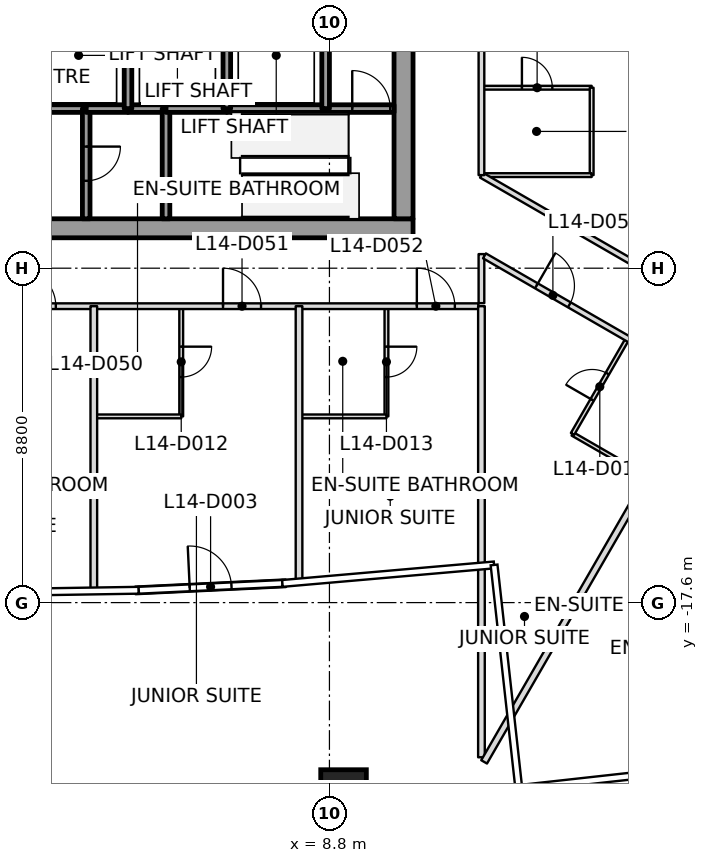
"""IFC4 building model, lengths in metres.
Left out: names, types, materials, properties, quantities, classifications, styles, units other than length and angle.
Written with IfcOpenShell. Run it as: python <this file> out.ifc"""

import sys

from ifc_helpers import new_model, si_unit, direction, frame, frame_2d, origin, origin_2d, place, context, subcontext, project, spatial, rectangle, extrude, clip, halfspace, element, fill, save


model = new_model("IFC4")
c1 = context("Model", 3, precision=1e-05, world=origin(), true_north=direction((0.0, 1.0)))
c2 = subcontext(c1, "Body", "Model", "MODEL_VIEW")
j1 = project(units=[si_unit("LENGTHUNIT", "METRE"), si_unit("PLANEANGLEUNIT", "RADIAN")], contexts=[c1])
p1 = place(None, origin())
s1 = spatial("IfcSite", under=j1, at=p1, CompositionType="ELEMENT")
p2 = place(p1, origin())
s2 = spatial("IfcBuilding", under=s1, at=p2, CompositionType="ELEMENT")
p3 = place(p2, frame((0.0, 0.0, 73.9)))
s3 = spatial("IfcBuildingStorey", under=s2, at=p3, CompositionType="ELEMENT", Elevation=73.9)
p4 = place(p3, frame((9.171, -22.598, 0.0), z_axis=(-0.009587956878, 0.096273594403, 0.99530872904), x_axis=(0.997257375326, 0.073971051832, 0.002451703273)))
e1 = element("IfcColumn", 1, at=p4, inside=s3, PredefinedType="COLUMN", context=c2, shape_type="SweptSolid", body=[
    clip(clip(extrude(rectangle(XDim=1.2, YDim=1.2, at=origin_2d()), origin(), (0.0, 0.0, 1.0), 3.718), halfspace(frame((0.0, 0.0, 0.018)), True)), halfspace(frame((0.0, 0.0, 3.699)), False)),
])
p5 = place(p3, frame((-11.0, -7.75, 0.0), z_axis=(0.0, 0.0, 1.0), x_axis=(1.0, 0.0, 0.0)))
e2 = element("IfcWall", 2, at=p5, inside=s3, PredefinedType="SHEAR", context=c2, shape_type="SweptSolid", body=[
    extrude(rectangle(XDim=22.0, YDim=0.5, at=frame_2d((11.0, 0.0))), origin(), (0.0, 0.0, 1.0), 3.7),
])
p6 = place(p5, frame((10.45, 0.0, 0.0)))
e3 = element("IfcOpeningElement", 3, at=p6, cuts=e2, PredefinedType="OPENING", context=c2, shape_type="SweptSolid", body=[
    extrude(rectangle(XDim=1.1, YDim=2.1, at=frame_2d((0.55, 1.05))), frame((0.0, 0.25, 0.0), z_axis=(0.0, -1.0, 0.0), x_axis=(1.0, 0.0, 0.0)), (0.0, 0.0, 1.0), 0.5),
])
p7 = place(p3, frame((10.75, -7.5, 0.0), z_axis=(0.0, 0.0, 1.0), x_axis=(0.0, 1.0, 0.0)))
e4 = element("IfcWall", 4, at=p7, inside=s3, PredefinedType="SHEAR", context=c2, shape_type="SweptSolid", body=[
    extrude(rectangle(XDim=15.0, YDim=0.5, at=frame_2d((7.5, 0.0))), origin(), (0.0, 0.0, 1.0), 3.7),
])
p8 = place(p7, frame((6.6, 0.0, 0.0)))
e5 = element("IfcOpeningElement", 5, at=p8, cuts=e4, PredefinedType="OPENING", context=c2, shape_type="SweptSolid", body=[
    extrude(rectangle(XDim=1.8, YDim=2.1, at=frame_2d((0.9, 1.05))), frame((0.0, 0.25, 0.0), z_axis=(0.0, -1.0, 0.0), x_axis=(1.0, 0.0, 0.0)), (0.0, 0.0, 1.0), 0.5),
])
p9 = place(p3, frame((3.693, -17.279, 0.0), z_axis=(0.0, 0.0, 1.0), x_axis=(0.998868834381, 0.047550517367, 0.0)))
e6 = element("IfcWall", 6, at=p9, inside=s3, PredefinedType="SOLIDWALL", context=c2, shape_type="SweptSolid", body=[
    extrude(rectangle(XDim=3.964, YDim=0.2, at=frame_2d((1.982, 0.0))), origin(), (0.0, 0.0, 1.0), 2.947),
])
p10 = place(p9, frame((1.432, 0.0, 0.0)))
e7 = element("IfcOpeningElement", 7, at=p10, cuts=e6, PredefinedType="OPENING", context=c2, shape_type="SweptSolid", body=[
    extrude(rectangle(XDim=1.1, YDim=2.1, at=frame_2d((0.55, 1.05))), frame((0.0, 0.1, 0.0), z_axis=(0.0, -1.0, 0.0), x_axis=(1.0, 0.0, 0.0)), (0.0, 0.0, 1.0), 0.2),
])
p11 = place(p3, frame((0.9, -4.6, 0.0), z_axis=(0.0, 0.0, 1.0), x_axis=(1.0, 0.0, 0.0)))
e8 = element("IfcWall", 8, at=p11, inside=s3, PredefinedType="SOLIDWALL", context=c2, shape_type="SweptSolid", body=[
    extrude(rectangle(XDim=1.5, YDim=0.2, at=frame_2d((0.75, 0.0))), origin(), (0.0, 0.0, 1.0), 3.55),
])
p12 = place(p3, frame((2.4, -4.6, 0.0), z_axis=(0.0, 0.0, 1.0), x_axis=(0.0, -1.0, 0.0)))
e9 = element("IfcWall", 9, at=p12, inside=s3, PredefinedType="SOLIDWALL", context=c2, shape_type="SweptSolid", body=[
    extrude(rectangle(XDim=2.9, YDim=0.2, at=frame_2d((1.45, 0.0))), origin(), (0.0, 0.0, 1.0), 3.55),
])
p13 = place(p12, frame((1.0, 0.0, 0.0)))
e10 = element("IfcOpeningElement", 10, at=p13, cuts=e9, PredefinedType="OPENING", context=c2, shape_type="SweptSolid", body=[
    extrude(rectangle(XDim=0.9, YDim=2.1, at=frame_2d((0.45, 1.05))), frame((0.0, 0.1, 0.0), z_axis=(0.0, -1.0, 0.0), x_axis=(1.0, 0.0, 0.0)), (0.0, 0.0, 1.0), 0.2),
])
p14 = place(p3, frame((3.5, -4.6, 0.0), z_axis=(0.0, 0.0, 1.0), x_axis=(-1.0, 0.0, 0.0)))
e11 = element("IfcWall", 11, at=p14, inside=s3, PredefinedType="SOLIDWALL", context=c2, shape_type="SweptSolid", body=[
    extrude(rectangle(XDim=1.1, YDim=0.2, at=frame_2d((0.55, 0.0))), origin(), (0.0, 0.0, 1.0), 3.55),
])
p15 = place(p3, frame((4.5, -4.6, 0.0), z_axis=(0.0, 0.0, 1.0), x_axis=(-1.0, 0.0, 0.0)))
e12 = element("IfcWall", 12, at=p15, inside=s3, PredefinedType="SOLIDWALL", context=c2, shape_type="SweptSolid", body=[
    extrude(rectangle(XDim=1.0, YDim=0.2, at=frame_2d((0.5, 0.0))), origin(), (0.0, 0.0, 1.0), 3.55),
])
p16 = place(p3, frame((3.5, -4.6, 0.0), z_axis=(0.0, 0.0, 1.0), x_axis=(0.0, 1.0, 0.0)))
e13 = element("IfcWall", 13, at=p16, inside=s3, PredefinedType="SOLIDWALL", context=c2, shape_type="SweptSolid", body=[
    extrude(rectangle(XDim=2.8, YDim=0.2, at=frame_2d((1.4, 0.0))), origin(), (0.0, 0.0, 1.0), 3.55),
])
p17 = place(p3, frame((4.5, -7.5, 0.0), z_axis=(0.0, 0.0, 1.0), x_axis=(0.0, 1.0, 0.0)))
e14 = element("IfcWall", 14, at=p17, inside=s3, PredefinedType="SOLIDWALL", context=c2, shape_type="SweptSolid", body=[
    extrude(rectangle(XDim=2.9, YDim=0.2, at=frame_2d((1.45, 0.0))), origin(), (0.0, 0.0, 1.0), 3.55),
])
p18 = place(p3, frame((4.5, -4.6, 0.0), z_axis=(0.0, 0.0, 1.0), x_axis=(1.0, 0.0, 0.0)))
e15 = element("IfcWall", 15, at=p18, inside=s3, PredefinedType="SOLIDWALL", context=c2, shape_type="SweptSolid", body=[
    extrude(rectangle(XDim=1.6, YDim=0.2, at=frame_2d((0.8, 0.0))), origin(), (0.0, 0.0, 1.0), 3.55),
])
p19 = place(p3, frame((6.1, -4.6, 0.0), z_axis=(0.0, 0.0, 1.0), x_axis=(1.0, 0.0, 0.0)))
e16 = element("IfcWall", 16, at=p19, inside=s3, PredefinedType="SOLIDWALL", context=c2, shape_type="SweptSolid", body=[
    extrude(rectangle(XDim=2.6, YDim=0.2, at=frame_2d((1.3, 0.0))), origin(), (0.0, 0.0, 1.0), 3.55),
])
p20 = place(p3, frame((6.1, -4.6, 0.0), z_axis=(0.0, 0.0, 1.0), x_axis=(0.0, 1.0, 0.0)))
e17 = element("IfcWall", 17, at=p20, inside=s3, PredefinedType="SOLIDWALL", context=c2, shape_type="SweptSolid", body=[
    extrude(rectangle(XDim=2.8, YDim=0.2, at=frame_2d((1.4, 0.0))), origin(), (0.0, 0.0, 1.0), 3.55),
])
p21 = place(p3, frame((8.7, -4.6, 0.0), z_axis=(0.0, 0.0, 1.0), x_axis=(1.0, 0.0, 0.0)))
e18 = element("IfcWall", 18, at=p21, inside=s3, PredefinedType="SOLIDWALL", context=c2, shape_type="SweptSolid", body=[
    extrude(rectangle(XDim=1.8, YDim=0.2, at=frame_2d((0.9, 0.0))), origin(), (0.0, 0.0, 1.0), 3.55),
])
p22 = place(p21, frame((0.7, 0.0, 0.0)))
e19 = element("IfcOpeningElement", 19, at=p22, cuts=e18, PredefinedType="OPENING", context=c2, shape_type="SweptSolid", body=[
    extrude(rectangle(XDim=1.0, YDim=2.1, at=frame_2d((0.5, 1.05))), frame((0.0, 0.1, 0.0), z_axis=(0.0, -1.0, 0.0), x_axis=(1.0, 0.0, 0.0)), (0.0, 0.0, 1.0), 0.2),
])
p23 = place(p3, frame((8.7, -1.8, 0.0), z_axis=(0.0, 0.0, 1.0), x_axis=(0.0, -1.0, 0.0)))
e20 = element("IfcWall", 20, at=p23, inside=s3, PredefinedType="SOLIDWALL", context=c2, shape_type="SweptSolid", body=[
    extrude(rectangle(XDim=2.8, YDim=0.2, at=frame_2d((1.4, 0.0))), origin(), (0.0, 0.0, 1.0), 3.55),
])
p24 = place(p3, frame((2.6, -9.8, 0.0), z_axis=(0.0, 0.0, 1.0), x_axis=(0.0, -1.0, 0.0)))
e21 = element("IfcWall", 21, at=p24, inside=s3, PredefinedType="PARTITIONING", context=c2, shape_type="SweptSolid", body=[
    extrude(rectangle(XDim=7.503, YDim=0.175, at=frame_2d((3.751, 0.0))), origin(), (0.0, 0.0, 1.0), 3.15),
])
p25 = place(p3, frame((8.0, -9.8, 0.0), z_axis=(0.0, 0.0, 1.0), x_axis=(0.0, -1.0, 0.0)))
e22 = element("IfcWall", 22, at=p25, inside=s3, PredefinedType="PARTITIONING", context=c2, shape_type="SweptSolid", body=[
    extrude(rectangle(XDim=7.264, YDim=0.175, at=frame_2d((3.632, 0.0))), origin(), (0.0, 0.0, 1.0), 3.15),
])
p26 = place(p3, frame((12.8, -9.8, 0.0), z_axis=(0.0, 0.0, 1.0), x_axis=(0.0, -1.0, 0.0)))
e23 = element("IfcWall", 23, at=p26, inside=s3, PredefinedType="PARTITIONING", context=c2, shape_type="SweptSolid", body=[
    extrude(rectangle(XDim=11.87, YDim=0.175, at=frame_2d((5.935, 0.0))), origin(), (0.0, 0.0, 1.0), 3.15),
])
p27 = place(p3, frame((18.638, -11.8, 0.0), z_axis=(0.0, 0.0, 1.0), x_axis=(-0.499983180204, -0.866035114481, 0.0)))
e24 = element("IfcWall", 24, at=p27, inside=s3, PredefinedType="PARTITIONING", context=c2, shape_type="SweptSolid", body=[
    extrude(rectangle(XDim=11.537, YDim=0.175, at=frame_2d((5.769, 0.0))), origin(), (0.0, 0.0, 1.0), 2.797),
])
p28 = place(p3, frame((-12.72, -9.8, 0.0), z_axis=(0.0, 0.0, 1.0), x_axis=(1.0, 0.0, 0.0)))
e25 = element("IfcWall", 25, at=p28, inside=s3, PredefinedType="PARTITIONING", context=c2, shape_type="SweptSolid", body=[
    extrude(rectangle(XDim=25.44, YDim=0.15, at=frame_2d((12.72, 0.0))), origin(), (0.0, 0.0, 1.0), 2.947),
])
p29 = place(p28, frame((3.22, 0.0, 0.0)))
e26 = element("IfcOpeningElement", 26, at=p29, cuts=e25, PredefinedType="OPENING", context=c2, shape_type="SweptSolid", body=[
    extrude(rectangle(XDim=1.0, YDim=2.1, at=frame_2d((0.5, 1.05))), frame((0.0, 0.075, 0.0), z_axis=(0.0, -1.0, 0.0), x_axis=(1.0, 0.0, 0.0)), (0.0, 0.0, 1.0), 0.15),
])
p30 = place(p28, frame((8.22, 0.0, 0.0)))
e27 = element("IfcOpeningElement", 27, at=p30, cuts=e25, PredefinedType="OPENING", context=c2, shape_type="SweptSolid", body=[
    extrude(rectangle(XDim=1.0, YDim=2.1, at=frame_2d((0.5, 1.05))), frame((0.0, 0.075, 0.0), z_axis=(0.0, -1.0, 0.0), x_axis=(1.0, 0.0, 0.0)), (0.0, 0.0, 1.0), 0.15),
])
p31 = place(p28, frame((13.32, 0.0, 0.0)))
e28 = element("IfcOpeningElement", 28, at=p31, cuts=e25, PredefinedType="OPENING", context=c2, shape_type="SweptSolid", body=[
    extrude(rectangle(XDim=1.0, YDim=2.1, at=frame_2d((0.5, 1.05))), frame((0.0, 0.075, 0.0), z_axis=(0.0, -1.0, 0.0), x_axis=(1.0, 0.0, 0.0)), (0.0, 0.0, 1.0), 0.15),
])
p32 = place(p28, frame((18.72, 0.0, 0.0)))
e29 = element("IfcOpeningElement", 29, at=p32, cuts=e25, PredefinedType="OPENING", context=c2, shape_type="SweptSolid", body=[
    extrude(rectangle(XDim=1.0, YDim=2.1, at=frame_2d((0.5, 1.05))), frame((0.0, 0.075, 0.0), z_axis=(0.0, -1.0, 0.0), x_axis=(1.0, 0.0, 0.0)), (0.0, 0.0, 1.0), 0.15),
])
p33 = place(p28, frame((23.82, 0.0, 0.0)))
e30 = element("IfcOpeningElement", 30, at=p33, cuts=e25, PredefinedType="OPENING", context=c2, shape_type="SweptSolid", body=[
    extrude(rectangle(XDim=1.0, YDim=2.1, at=frame_2d((0.5, 1.05))), frame((0.0, 0.075, 0.0), z_axis=(0.0, -1.0, 0.0), x_axis=(1.0, 0.0, 0.0)), (0.0, 0.0, 1.0), 0.15),
])
p34 = place(p3, frame((12.8, -9.72, 0.0), z_axis=(0.0, 0.0, 1.0), x_axis=(0.0, 1.0, 0.0)))
e31 = element("IfcWall", 31, at=p34, inside=s3, PredefinedType="PARTITIONING", context=c2, shape_type="SweptSolid", body=[
    extrude(rectangle(XDim=1.291, YDim=0.15, at=frame_2d((0.646, 0.0))), origin(), (0.0, 0.0, 1.0), 2.797),
])
p35 = place(p3, frame((12.879, -8.475, 0.0), z_axis=(0.0, 0.0, 1.0), x_axis=(0.866022251081, -0.500005460603, 0.0)))
e32 = element("IfcWall", 32, at=p35, inside=s3, PredefinedType="PARTITIONING", context=c2, shape_type="SweptSolid", body=[
    extrude(rectangle(XDim=11.45, YDim=0.15, at=frame_2d((5.725, 0.0))), origin(), (0.0, 0.0, 1.0), 2.797),
])
p36 = place(p35, frame((1.579, 0.0, 0.0)))
e33 = element("IfcOpeningElement", 33, at=p36, cuts=e32, PredefinedType="OPENING", context=c2, shape_type="SweptSolid", body=[
    extrude(rectangle(XDim=1.0, YDim=2.1, at=frame_2d((0.5, 1.05))), frame((0.0, 0.075, 0.0), z_axis=(0.0, -1.0, 0.0), x_axis=(1.0, 0.0, 0.0)), (0.0, 0.0, 1.0), 0.15),
])
p37 = place(p35, frame((9.75, 0.0, 0.0)))
e34 = element("IfcOpeningElement", 34, at=p37, cuts=e32, PredefinedType="OPENING", context=c2, shape_type="SweptSolid", body=[
    extrude(rectangle(XDim=1.0, YDim=2.1, at=frame_2d((0.5, 1.05))), frame((0.0, 0.075, 0.0), z_axis=(0.0, -1.0, 0.0), x_axis=(1.0, 0.0, 0.0)), (0.0, 0.0, 1.0), 0.15),
])
p38 = place(p3, frame((23.626, -12.601, 0.0), z_axis=(0.0, 0.0, 1.0), x_axis=(-0.866025575766, 0.499999702119, 0.0)))
e35 = element("IfcWall", 35, at=p38, inside=s3, PredefinedType="PARTITIONING", context=c2, shape_type="SweptSolid", body=[
    extrude(rectangle(XDim=12.501, YDim=0.15, at=frame_2d((6.25, 0.0))), origin(), (0.0, 0.0, 1.0), 2.947),
])
p39 = place(p38, frame((4.51, 0.0, 0.0)))
e36 = element("IfcOpeningElement", 36, at=p39, cuts=e35, PredefinedType="OPENING", context=c2, shape_type="SweptSolid", body=[
    extrude(rectangle(XDim=1.0, YDim=2.1, at=frame_2d((0.5, 1.05))), frame((0.0, 0.075, 0.0), z_axis=(0.0, -1.0, 0.0), x_axis=(1.0, 0.0, 0.0)), (0.0, 0.0, 1.0), 0.15),
])
p40 = place(p3, frame((12.8, -6.351, 0.0), z_axis=(0.0, 0.0, 1.0), x_axis=(0.0, 1.0, 0.0)))
e37 = element("IfcWall", 37, at=p40, inside=s3, PredefinedType="PARTITIONING", context=c2, shape_type="SweptSolid", body=[
    extrude(rectangle(XDim=16.071, YDim=0.15, at=frame_2d((8.035, 0.0))), origin(), (0.0, 0.0, 1.0), 2.947),
])
p41 = place(p40, frame((13.251, 0.0, 0.0)))
e38 = element("IfcOpeningElement", 38, at=p41, cuts=e37, PredefinedType="OPENING", context=c2, shape_type="SweptSolid", body=[
    extrude(rectangle(XDim=1.0, YDim=2.1, at=frame_2d((0.5, 1.05))), frame((0.0, 0.075, 0.0), z_axis=(0.0, -1.0, 0.0), x_axis=(1.0, 0.0, 0.0)), (0.0, 0.0, 1.0), 0.15),
])
p42 = place(p40, frame((6.375, 0.0, 0.0)))
e39 = element("IfcOpeningElement", 39, at=p42, cuts=e37, PredefinedType="OPENING", context=c2, shape_type="SweptSolid", body=[
    extrude(rectangle(XDim=1.0, YDim=2.1, at=frame_2d((0.5, 1.05))), frame((0.0, 0.075, 0.0), z_axis=(0.0, -1.0, 0.0), x_axis=(1.0, 0.0, 0.0)), (0.0, 0.0, 1.0), 0.15),
])
p43 = place(p3, frame((4.9, -9.83, 0.0), z_axis=(0.0, 0.0, 1.0), x_axis=(0.0, -1.0, 0.0)))
e40 = element("IfcWall", 40, at=p43, inside=s3, PredefinedType="PARTITIONING", context=c2, shape_type="SweptSolid", body=[
    extrude(rectangle(XDim=2.87, YDim=0.1, at=frame_2d((1.435, 0.0))), origin(), (0.0, 0.0, 1.0), 2.947),
])
p44 = place(p43, frame((1.035, 0.0, 0.0)))
e41 = element("IfcOpeningElement", 41, at=p44, cuts=e40, PredefinedType="OPENING", context=c2, shape_type="SweptSolid", body=[
    extrude(rectangle(XDim=0.8, YDim=2.1, at=frame_2d((0.4, 1.05))), frame((0.0, 0.05, 0.0), z_axis=(0.0, -1.0, 0.0), x_axis=(1.0, 0.0, 0.0)), (0.0, 0.0, 1.0), 0.1),
])
p45 = place(p3, frame((4.9, -12.7, 0.0), z_axis=(0.0, 0.0, 1.0), x_axis=(-1.0, 0.0, 0.0)))
e42 = element("IfcWall", 42, at=p45, inside=s3, PredefinedType="PARTITIONING", context=c2, shape_type="SweptSolid", body=[
    extrude(rectangle(XDim=2.27, YDim=0.1, at=frame_2d((1.135, 0.0))), origin(), (0.0, 0.0, 1.0), 2.947),
])
p46 = place(p3, frame((10.3, -9.83, 0.0), z_axis=(0.0, 0.0, 1.0), x_axis=(0.0, -1.0, 0.0)))
e43 = element("IfcWall", 43, at=p46, inside=s3, PredefinedType="PARTITIONING", context=c2, shape_type="SweptSolid", body=[
    extrude(rectangle(XDim=2.87, YDim=0.1, at=frame_2d((1.435, 0.0))), origin(), (0.0, 0.0, 1.0), 3.15),
])
p47 = place(p46, frame((1.035, 0.0, 0.0)))
e44 = element("IfcOpeningElement", 44, at=p47, cuts=e43, PredefinedType="OPENING", context=c2, shape_type="SweptSolid", body=[
    extrude(rectangle(XDim=0.8, YDim=2.1, at=frame_2d((0.4, 1.05))), frame((0.0, 0.05, 0.0), z_axis=(0.0, -1.0, 0.0), x_axis=(1.0, 0.0, 0.0)), (0.0, 0.0, 1.0), 0.1),
])
p48 = place(p3, frame((10.3, -12.7, 0.0), z_axis=(0.0, 0.0, 1.0), x_axis=(-1.0, 0.0, 0.0)))
e45 = element("IfcWall", 45, at=p48, inside=s3, PredefinedType="PARTITIONING", context=c2, shape_type="SweptSolid", body=[
    extrude(rectangle(XDim=2.27, YDim=0.1, at=frame_2d((1.135, 0.0))), origin(), (0.0, 0.0, 1.0), 3.15),
])
p49 = place(p3, frame((12.83, -4.051, 0.0), z_axis=(0.0, 0.0, 1.0), x_axis=(1.0, 0.0, 0.0)))
e46 = element("IfcWall", 46, at=p49, inside=s3, PredefinedType="PARTITIONING", context=c2, shape_type="SweptSolid", body=[
    extrude(rectangle(XDim=2.87, YDim=0.1, at=frame_2d((1.435, 0.0))), origin(), (0.0, 0.0, 1.0), 3.15),
])
p50 = place(p49, frame((1.035, 0.0, 0.0)))
e47 = element("IfcOpeningElement", 47, at=p50, cuts=e46, PredefinedType="OPENING", context=c2, shape_type="SweptSolid", body=[
    extrude(rectangle(XDim=0.8, YDim=2.1, at=frame_2d((0.4, 1.05))), frame((0.0, 0.05, 0.0), z_axis=(0.0, -1.0, 0.0), x_axis=(1.0, 0.0, 0.0)), (0.0, 0.0, 1.0), 0.1),
])
p51 = place(p3, frame((15.7, -4.051, 0.0), z_axis=(0.0, 0.0, 1.0), x_axis=(0.0, -1.0, 0.0)))
e48 = element("IfcWall", 48, at=p51, inside=s3, PredefinedType="PARTITIONING", context=c2, shape_type="SweptSolid", body=[
    extrude(rectangle(XDim=2.3, YDim=0.1, at=frame_2d((1.15, 0.0))), origin(), (0.0, 0.0, 1.0), 2.947),
])
p52 = place(p3, frame((15.7, -6.351, 0.0), z_axis=(0.0, 0.0, 1.0), x_axis=(-1.0, 0.0, 0.0)))
e49 = element("IfcWall", 49, at=p52, inside=s3, PredefinedType="PARTITIONING", context=c2, shape_type="SweptSolid", body=[
    extrude(rectangle(XDim=2.84, YDim=0.1, at=frame_2d((1.42, 0.0))), origin(), (0.0, 0.0, 1.0), 3.15),
])
p53 = place(p3, frame((17.163, -14.297, 0.0), z_axis=(0.0, 0.0, 1.0), x_axis=(-0.866044110172, 0.499967598186, 0.0)))
e50 = element("IfcWall", 50, at=p53, inside=s3, PredefinedType="PARTITIONING", context=c2, shape_type="SweptSolid", body=[
    extrude(rectangle(XDim=2.27, YDim=0.1, at=frame_2d((1.135, 0.0))), origin(), (0.0, 0.0, 1.0), 3.15),
])
p54 = place(p3, frame((15.197, -13.162, 0.0), z_axis=(0.0, 0.0, 1.0), x_axis=(0.499999802827, 0.866025517622, 0.0)))
e51 = element("IfcWall", 51, at=p54, inside=s3, PredefinedType="PARTITIONING", context=c2, shape_type="SweptSolid", body=[
    extrude(rectangle(XDim=2.87, YDim=0.1, at=frame_2d((1.435, 0.0))), origin(), (0.0, 0.0, 1.0), 2.797),
])
p55 = place(p54, frame((1.035, 0.0, 0.0)))
e52 = element("IfcOpeningElement", 52, at=p55, cuts=e51, PredefinedType="OPENING", context=c2, shape_type="SweptSolid", body=[
    extrude(rectangle(XDim=0.8, YDim=2.1, at=frame_2d((0.4, 1.05))), frame((0.0, 0.05, 0.0), z_axis=(0.0, -1.0, 0.0), x_axis=(1.0, 0.0, 0.0)), (0.0, 0.0, 1.0), 0.1),
])
p56 = place(p10, origin())
e53 = element("IfcDoor", 53, at=p56, inside=s3, OperationType="SINGLE_SWING_RIGHT", PredefinedType="DOOR", context=c2, shape_type="SweptSolid", body=[
    extrude(rectangle(XDim=1.1, YDim=2.1, at=frame_2d((0.55, 1.05))), frame((0.0, 0.025, 0.0), z_axis=(0.0, -1.0, 0.0), x_axis=(1.0, 0.0, 0.0)), (0.0, 0.0, 1.0), 0.05),
])
fill(e7, e53)
p57 = place(p31, origin())
e54 = element("IfcDoor", 54, at=p57, inside=s3, OperationType="SINGLE_SWING_LEFT", PredefinedType="DOOR", context=c2, shape_type="SweptSolid", body=[
    extrude(rectangle(XDim=1.0, YDim=2.1, at=frame_2d((0.5, 1.05))), frame((0.0, 0.025, 0.0), z_axis=(0.0, -1.0, 0.0), x_axis=(1.0, 0.0, 0.0)), (0.0, 0.0, 1.0), 0.05),
])
fill(e28, e54)
p58 = place(p32, origin())
e55 = element("IfcDoor", 55, at=p58, inside=s3, OperationType="SINGLE_SWING_LEFT", PredefinedType="DOOR", context=c2, shape_type="SweptSolid", body=[
    extrude(rectangle(XDim=1.0, YDim=2.1, at=frame_2d((0.5, 1.05))), frame((0.0, 0.025, 0.0), z_axis=(0.0, -1.0, 0.0), x_axis=(1.0, 0.0, 0.0)), (0.0, 0.0, 1.0), 0.05),
])
fill(e29, e55)
p59 = place(p44, origin())
e56 = element("IfcDoor", 56, at=p59, inside=s3, OperationType="SINGLE_SWING_RIGHT", PredefinedType="DOOR", context=c2, shape_type="SweptSolid", body=[
    extrude(rectangle(XDim=0.8, YDim=2.1, at=frame_2d((0.4, 1.05))), frame((0.0, 0.025, 0.0), z_axis=(0.0, -1.0, 0.0), x_axis=(1.0, 0.0, 0.0)), (0.0, 0.0, 1.0), 0.05),
])
fill(e41, e56)
p60 = place(p33, origin())
e57 = element("IfcDoor", 57, at=p60, inside=s3, OperationType="SINGLE_SWING_LEFT", PredefinedType="DOOR", context=c2, shape_type="SweptSolid", body=[
    extrude(rectangle(XDim=1.0, YDim=2.1, at=frame_2d((0.5, 1.05))), frame((0.0, 0.025, 0.0), z_axis=(0.0, -1.0, 0.0), x_axis=(1.0, 0.0, 0.0)), (0.0, 0.0, 1.0), 0.05),
])
fill(e30, e57)
p61 = place(p47, origin())
e58 = element("IfcDoor", 58, at=p61, inside=s3, OperationType="SINGLE_SWING_LEFT", PredefinedType="DOOR", context=c2, shape_type="SweptSolid", body=[
    extrude(rectangle(XDim=0.8, YDim=2.1, at=frame_2d((0.4, 1.05))), frame((0.0, 0.025, 0.0), z_axis=(0.0, -1.0, 0.0), x_axis=(1.0, 0.0, 0.0)), (0.0, 0.0, 1.0), 0.05),
])
fill(e44, e58)
p62 = place(p36, origin())
e59 = element("IfcDoor", 59, at=p62, inside=s3, OperationType="SINGLE_SWING_RIGHT", PredefinedType="DOOR", context=c2, shape_type="SweptSolid", body=[
    extrude(rectangle(XDim=1.0, YDim=2.1, at=frame_2d((0.5, 1.05))), frame((0.0, 0.025, 0.0), z_axis=(0.0, -1.0, 0.0), x_axis=(1.0, 0.0, 0.0)), (0.0, 0.0, 1.0), 0.05),
])
fill(e33, e59)
p63 = place(p55, origin())
e60 = element("IfcDoor", 60, at=p63, inside=s3, OperationType="SINGLE_SWING_RIGHT", PredefinedType="DOOR", context=c2, shape_type="SweptSolid", body=[
    extrude(rectangle(XDim=0.8, YDim=2.1, at=frame_2d((0.4, 1.05))), frame((0.0, 0.025, 0.0), z_axis=(0.0, -1.0, 0.0), x_axis=(1.0, 0.0, 0.0)), (0.0, 0.0, 1.0), 0.05),
])
fill(e52, e60)
p64 = place(p50, origin())
e61 = element("IfcDoor", 61, at=p64, inside=s3, OperationType="SINGLE_SWING_LEFT", PredefinedType="DOOR", context=c2, shape_type="SweptSolid", body=[
    extrude(rectangle(XDim=0.8, YDim=2.1, at=frame_2d((0.4, 1.05))), frame((0.0, 0.025, 0.0), z_axis=(0.0, -1.0, 0.0), x_axis=(1.0, 0.0, 0.0)), (0.0, 0.0, 1.0), 0.05),
])
fill(e47, e61)
p65 = place(p22, origin())
e62 = element("IfcDoor", 62, at=p65, inside=s3, OperationType="SINGLE_SWING_RIGHT", PredefinedType="DOOR", context=c2, shape_type="SweptSolid", body=[
    extrude(rectangle(XDim=1.0, YDim=2.1, at=frame_2d((0.5, 1.05))), frame((0.0, 0.025, 0.0), z_axis=(0.0, -1.0, 0.0), x_axis=(1.0, 0.0, 0.0)), (0.0, 0.0, 1.0), 0.05),
])
fill(e19, e62)
p66 = place(p13, origin())
e63 = element("IfcDoor", 63, at=p66, inside=s3, OperationType="SINGLE_SWING_LEFT", PredefinedType="DOOR", context=c2, shape_type="SweptSolid", body=[
    extrude(rectangle(XDim=0.9, YDim=2.1, at=frame_2d((0.45, 1.05))), frame((0.0, 0.025, 0.0), z_axis=(0.0, -1.0, 0.0), x_axis=(1.0, 0.0, 0.0)), (0.0, 0.0, 1.0), 0.05),
])
fill(e10, e63)
save(model, sys.argv[1])
